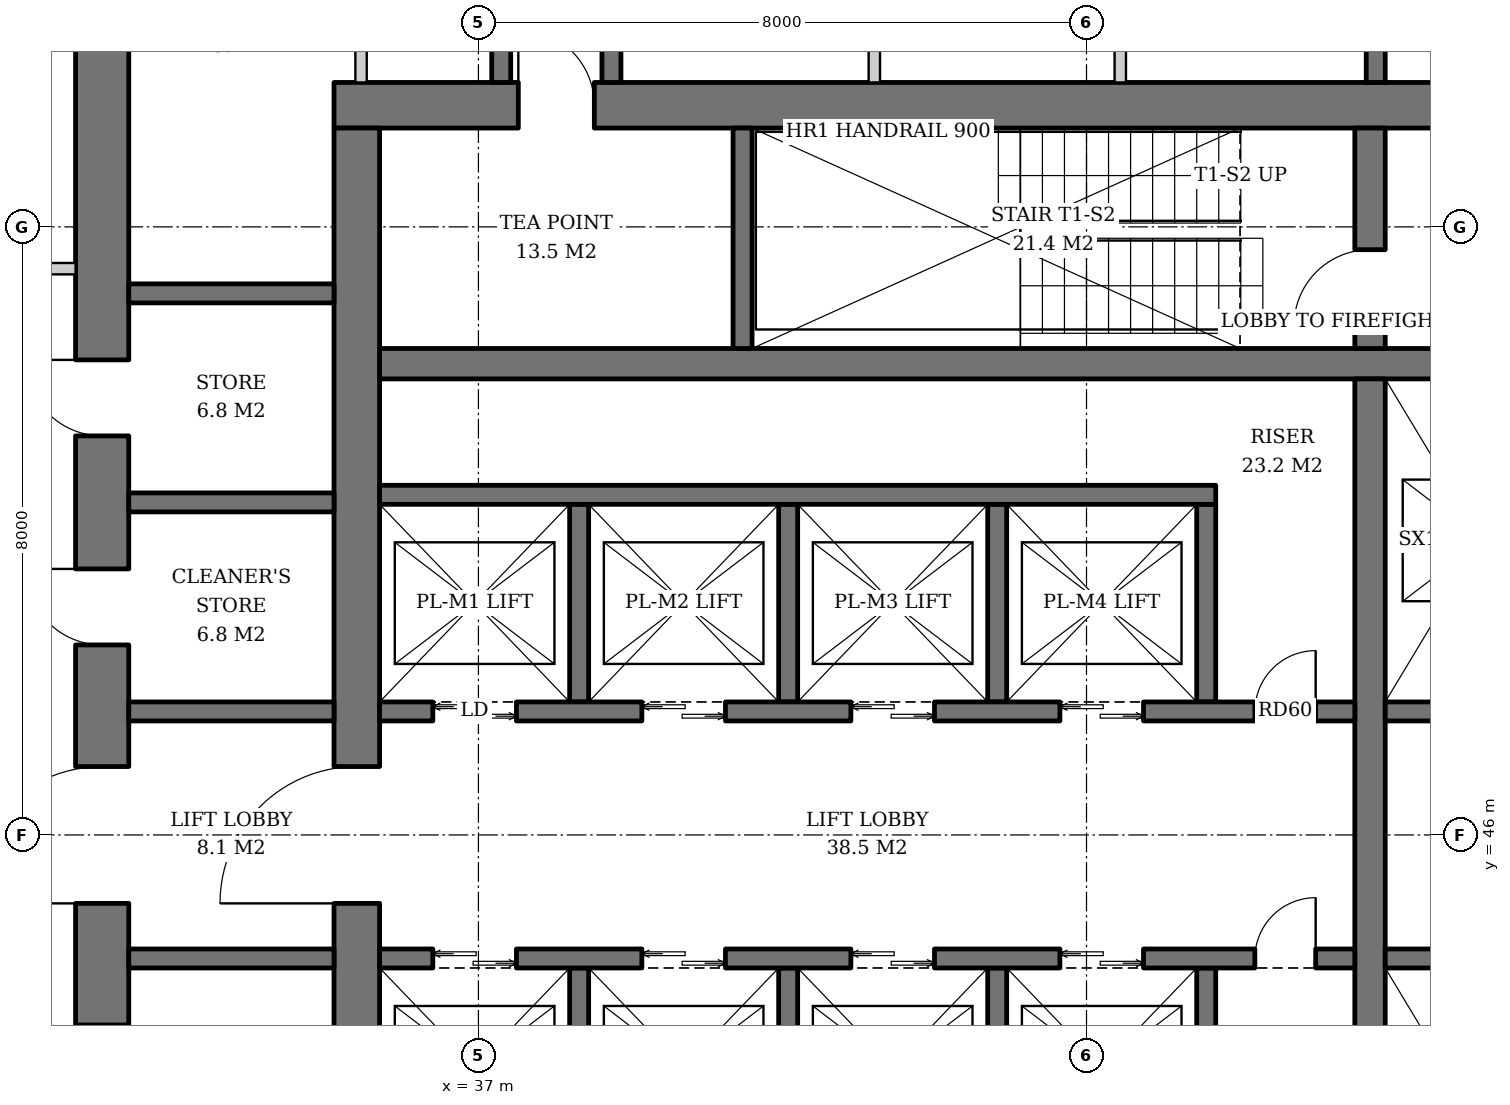
"""IFC4 building model, lengths in metres.
Left out: names, types, materials, properties, quantities, classifications, styles, units other than length and angle.
Written with IfcOpenShell. Run it as: python <this file> out.ifc"""

import sys

from ifc_helpers import new_model, si_unit, direction, frame, frame_2d, origin, place, context, subcontext, project, spatial, rectangle, extrude, element, fill, save


model = new_model("IFC4")
c1 = context("Model", 3, precision=1e-05, world=origin(), true_north=direction((0.0, 1.0)))
c2 = subcontext(c1, "Body", "Model", "MODEL_VIEW")
j1 = project(units=[si_unit("LENGTHUNIT", "METRE"), si_unit("PLANEANGLEUNIT", "RADIAN")], contexts=[c1])
p1 = place(None, origin())
s1 = spatial("IfcSite", under=j1, at=p1, CompositionType="ELEMENT")
p2 = place(p1, origin())
s2 = spatial("IfcBuilding", under=s1, at=p2, CompositionType="ELEMENT")
p3 = place(p2, frame((0.0, 0.0, 138.8)))
s3 = spatial("IfcBuildingStorey", under=s2, at=p3, CompositionType="ELEMENT", Elevation=138.8)
p4 = place(p3, frame((35.1, 55.6, 0.0), z_axis=(0.0, 0.0, 1.0), x_axis=(1.0, 0.0, 0.0)))
e1 = element("IfcWall", 1, at=p4, inside=s3, PredefinedType="SHEAR", context=c2, shape_type="SweptSolid", body=[
    extrude(rectangle(XDim=19.8, YDim=0.6, at=frame_2d((9.9, 0.0))), origin(), (0.0, 0.0, 1.0), 3.8),
])
p5 = place(p4, frame((14.54, 0.0, 0.0)))
e2 = element("IfcOpeningElement", 2, at=p5, cuts=e1, PredefinedType="OPENING", context=c2, shape_type="SweptSolid", body=[
    extrude(rectangle(XDim=1.0, YDim=2.1, at=frame_2d((0.5, 1.05))), frame((0.0, 0.31, 0.0), z_axis=(0.0, -1.0, 0.0), x_axis=(1.0, 0.0, 0.0)), (0.0, 0.0, 1.0), 0.62),
])
p6 = place(p4, frame((2.425, 0.0, 0.0)))
e3 = element("IfcOpeningElement", 3, at=p6, cuts=e1, PredefinedType="OPENING", context=c2, shape_type="SweptSolid", body=[
    extrude(rectangle(XDim=1.0, YDim=2.1, at=frame_2d((0.5, 1.05))), frame((0.0, 0.31, 0.0), z_axis=(0.0, -1.0, 0.0), x_axis=(1.0, 0.0, 0.0)), (0.0, 0.0, 1.0), 0.62),
])
p7 = place(p3, frame((35.4, 36.7, 0.0), z_axis=(0.0, 0.0, 1.0), x_axis=(0.0, 1.0, 0.0)))
e4 = element("IfcWall", 4, at=p7, inside=s3, PredefinedType="SHEAR", context=c2, shape_type="SweptSolid", body=[
    extrude(rectangle(XDim=18.6, YDim=0.6, at=frame_2d((9.3, 0.0))), origin(), (0.0, 0.0, 1.0), 3.8),
])
p8 = place(p7, frame((8.4, 0.0, 0.0)))
e5 = element("IfcOpeningElement", 5, at=p8, cuts=e4, PredefinedType="OPENING", context=c2, shape_type="SweptSolid", body=[
    extrude(rectangle(XDim=1.8, YDim=2.4, at=frame_2d((0.9, 1.2))), frame((0.0, 0.31, 0.0), z_axis=(0.0, -1.0, 0.0), x_axis=(1.0, 0.0, 0.0)), (0.0, 0.0, 1.0), 0.62),
])
p9 = place(p3, frame((32.05, 33.4, 0.0), z_axis=(0.0, 0.0, 1.0), x_axis=(0.0, 1.0, 0.0)))
e6 = element("IfcWall", 6, at=p9, inside=s3, PredefinedType="SHEAR", context=c2, shape_type="SweptSolid", body=[
    extrude(rectangle(XDim=25.2, YDim=0.7, at=frame_2d((12.6, 0.0))), origin(), (0.0, 0.0, 1.0), 3.8),
])
p10 = place(p9, frame((11.7, 0.0, 0.0)))
e7 = element("IfcOpeningElement", 7, at=p10, cuts=e6, PredefinedType="OPENING", context=c2, shape_type="SweptSolid", body=[
    extrude(rectangle(XDim=1.8, YDim=2.4, at=frame_2d((0.9, 1.2))), frame((0.0, 0.36, 0.0), z_axis=(0.0, -1.0, 0.0), x_axis=(1.0, 0.0, 0.0)), (0.0, 0.0, 1.0), 0.72),
])
p11 = place(p9, frame((3.6, 0.0, 0.0)))
e8 = element("IfcOpeningElement", 8, at=p11, cuts=e6, PredefinedType="OPENING", context=c2, shape_type="SweptSolid", body=[
    extrude(rectangle(XDim=1.0, YDim=2.1, at=frame_2d((0.5, 1.05))), frame((0.0, 0.36, 0.0), z_axis=(0.0, -1.0, 0.0), x_axis=(1.0, 0.0, 0.0)), (0.0, 0.0, 1.0), 0.72),
])
p12 = place(p9, frame((6.35, 0.0, 0.0)))
e9 = element("IfcOpeningElement", 9, at=p12, cuts=e6, PredefinedType="OPENING", context=c2, shape_type="SweptSolid", body=[
    extrude(rectangle(XDim=1.0, YDim=2.1, at=frame_2d((0.5, 1.05))), frame((0.0, 0.36, 0.0), z_axis=(0.0, -1.0, 0.0), x_axis=(1.0, 0.0, 0.0)), (0.0, 0.0, 1.0), 0.72),
])
p13 = place(p9, frame((9.1, 0.0, 0.0)))
e10 = element("IfcOpeningElement", 10, at=p13, cuts=e6, PredefinedType="OPENING", context=c2, shape_type="SweptSolid", body=[
    extrude(rectangle(XDim=1.0, YDim=2.1, at=frame_2d((0.5, 1.05))), frame((0.0, 0.36, 0.0), z_axis=(0.0, -1.0, 0.0), x_axis=(1.0, 0.0, 0.0)), (0.0, 0.0, 1.0), 0.72),
])
p14 = place(p9, frame((15.1, 0.0, 0.0)))
e11 = element("IfcOpeningElement", 11, at=p14, cuts=e6, PredefinedType="OPENING", context=c2, shape_type="SweptSolid", body=[
    extrude(rectangle(XDim=1.0, YDim=2.1, at=frame_2d((0.5, 1.05))), frame((0.0, 0.36, 0.0), z_axis=(0.0, -1.0, 0.0), x_axis=(1.0, 0.0, 0.0)), (0.0, 0.0, 1.0), 0.72),
])
p15 = place(p9, frame((17.85, 0.0, 0.0)))
e12 = element("IfcOpeningElement", 12, at=p15, cuts=e6, PredefinedType="OPENING", context=c2, shape_type="SweptSolid", body=[
    extrude(rectangle(XDim=1.0, YDim=2.1, at=frame_2d((0.5, 1.05))), frame((0.0, 0.36, 0.0), z_axis=(0.0, -1.0, 0.0), x_axis=(1.0, 0.0, 0.0)), (0.0, 0.0, 1.0), 0.72),
])
p16 = place(p3, frame((35.7, 52.2, 0.0), z_axis=(0.0, 0.0, 1.0), x_axis=(1.0, 0.0, 0.0)))
e13 = element("IfcWall", 13, at=p16, inside=s3, PredefinedType="SHEAR", context=c2, shape_type="SweptSolid", body=[
    extrude(rectangle(XDim=18.6, YDim=0.4, at=frame_2d((9.3, 0.0))), origin(), (0.0, 0.0, 1.0), 3.8),
])
p17 = place(p3, frame((48.73, 40.0, 0.0), z_axis=(0.0, 0.0, 1.0), x_axis=(0.0, 1.0, 0.0)))
e14 = element("IfcWall", 14, at=p17, inside=s3, PredefinedType="SHEAR", context=c2, shape_type="SweptSolid", body=[
    extrude(rectangle(XDim=12.0, YDim=0.4, at=frame_2d((6.0, 0.0))), origin(), (0.0, 0.0, 1.0), 3.8),
])
p18 = place(p3, frame((48.73, 52.4, 0.0), z_axis=(0.0, 0.0, 1.0), x_axis=(0.0, 1.0, 0.0)))
e15 = element("IfcWall", 15, at=p18, inside=s3, PredefinedType="SHEAR", context=c2, shape_type="SweptSolid", body=[
    extrude(rectangle(XDim=2.9, YDim=0.4, at=frame_2d((1.45, 0.0))), origin(), (0.0, 0.0, 1.0), 3.8),
])
p19 = place(p18, frame((0.3, 0.0, 0.0)))
e16 = element("IfcOpeningElement", 16, at=p19, cuts=e15, PredefinedType="OPENING", context=c2, shape_type="SweptSolid", body=[
    extrude(rectangle(XDim=1.0, YDim=2.1, at=frame_2d((0.5, 1.05))), frame((0.0, 0.21, 0.0), z_axis=(0.0, -1.0, 0.0), x_axis=(1.0, 0.0, 0.0)), (0.0, 0.0, 1.0), 0.42),
])
p20 = place(p3, frame((40.475, 52.4, 0.0), z_axis=(0.0, 0.0, 1.0), x_axis=(0.0, 1.0, 0.0)))
e17 = element("IfcWall", 17, at=p20, inside=s3, PredefinedType="SHEAR", context=c2, shape_type="SweptSolid", body=[
    extrude(rectangle(XDim=2.9, YDim=0.25, at=frame_2d((1.45, 0.0))), origin(), (0.0, 0.0, 1.0), 3.8),
])
for number, where, z_axis, x_axis in (
    (18, (38.325, 47.75, 0.0), (0.0, 0.0, 1.0), (0.0, 1.0, 0.0)),
    (19, (41.075, 47.75, 0.0), (0.0, 0.0, 1.0), (0.0, 1.0, 0.0)),
    (20, (43.825, 47.75, 0.0), (0.0, 0.0, 1.0), (0.0, 1.0, 0.0)),
    (21, (46.575, 47.75, 0.0), (0.0, 0.0, 1.0), (0.0, 1.0, 0.0)),
):
    element("IfcWall", number, at=place(p3, frame(where, z_axis=z_axis, x_axis=x_axis)), inside=s3, PredefinedType="SHEAR", context=c2, shape_type="SweptSolid", body=[
        extrude(rectangle(XDim=2.6, YDim=0.25, at=frame_2d((1.3, 0.0))), origin(), (0.0, 0.0, 1.0), 3.8),
    ])
p21 = place(p3, frame((35.7, 50.475, 0.0), z_axis=(0.0, 0.0, 1.0), x_axis=(1.0, 0.0, 0.0)))
e22 = element("IfcWall", 22, at=p21, inside=s3, PredefinedType="SHEAR", context=c2, shape_type="SweptSolid", body=[
    extrude(rectangle(XDim=11.0, YDim=0.25, at=frame_2d((5.5, 0.0))), origin(), (0.0, 0.0, 1.0), 3.8),
])
p22 = place(p3, frame((35.7, 47.625, 0.0), z_axis=(0.0, 0.0, 1.0), x_axis=(1.0, 0.0, 0.0)))
e23 = element("IfcWall", 23, at=p22, inside=s3, PredefinedType="SHEAR", context=c2, shape_type="SweptSolid", body=[
    extrude(rectangle(XDim=12.83, YDim=0.25, at=frame_2d((6.415, 0.0))), origin(), (0.0, 0.0, 1.0), 3.8),
])
p23 = place(p22, frame((0.7, 0.0, 0.0)))
e24 = element("IfcOpeningElement", 24, at=p23, cuts=e23, PredefinedType="OPENING", context=c2, shape_type="SweptSolid", body=[
    extrude(rectangle(XDim=1.1, YDim=2.2, at=frame_2d((0.55, 1.1))), frame((0.0, 0.135, 0.0), z_axis=(0.0, -1.0, 0.0), x_axis=(1.0, 0.0, 0.0)), (0.0, 0.0, 1.0), 0.27),
])
p24 = place(p22, frame((3.45, 0.0, 0.0)))
e25 = element("IfcOpeningElement", 25, at=p24, cuts=e23, PredefinedType="OPENING", context=c2, shape_type="SweptSolid", body=[
    extrude(rectangle(XDim=1.1, YDim=2.2, at=frame_2d((0.55, 1.1))), frame((0.0, 0.135, 0.0), z_axis=(0.0, -1.0, 0.0), x_axis=(1.0, 0.0, 0.0)), (0.0, 0.0, 1.0), 0.27),
])
p25 = place(p22, frame((6.2, 0.0, 0.0)))
e26 = element("IfcOpeningElement", 26, at=p25, cuts=e23, PredefinedType="OPENING", context=c2, shape_type="SweptSolid", body=[
    extrude(rectangle(XDim=1.1, YDim=2.2, at=frame_2d((0.55, 1.1))), frame((0.0, 0.135, 0.0), z_axis=(0.0, -1.0, 0.0), x_axis=(1.0, 0.0, 0.0)), (0.0, 0.0, 1.0), 0.27),
])
p26 = place(p22, frame((8.95, 0.0, 0.0)))
e27 = element("IfcOpeningElement", 27, at=p26, cuts=e23, PredefinedType="OPENING", context=c2, shape_type="SweptSolid", body=[
    extrude(rectangle(XDim=1.1, YDim=2.2, at=frame_2d((0.55, 1.1))), frame((0.0, 0.135, 0.0), z_axis=(0.0, -1.0, 0.0), x_axis=(1.0, 0.0, 0.0)), (0.0, 0.0, 1.0), 0.27),
])
p27 = place(p22, frame((11.515, 0.0, 0.0)))
e28 = element("IfcOpeningElement", 28, at=p27, cuts=e23, PredefinedType="OPENING", context=c2, shape_type="SweptSolid", body=[
    extrude(rectangle(XDim=0.8, YDim=2.0, at=frame_2d((0.4, 1.0))), frame((0.0, 0.135, 0.0), z_axis=(0.0, -1.0, 0.0), x_axis=(1.0, 0.0, 0.0)), (0.0, 0.0, 1.0), 0.27),
])
for number, where, z_axis, x_axis in (
    (29, (38.325, 44.25, 0.0), (0.0, 0.0, 1.0), (0.0, -1.0, 0.0)),
    (30, (41.075, 44.25, 0.0), (0.0, 0.0, 1.0), (0.0, -1.0, 0.0)),
    (31, (43.825, 44.25, 0.0), (0.0, 0.0, 1.0), (0.0, -1.0, 0.0)),
    (32, (46.575, 44.25, 0.0), (0.0, 0.0, 1.0), (0.0, -1.0, 0.0)),
):
    element("IfcWall", number, at=place(p3, frame(where, z_axis=z_axis, x_axis=x_axis)), inside=s3, PredefinedType="SHEAR", context=c2, shape_type="SweptSolid", body=[
        extrude(rectangle(XDim=2.6, YDim=0.25, at=frame_2d((1.3, 0.0))), origin(), (0.0, 0.0, 1.0), 3.8),
    ])
p28 = place(p3, frame((35.7, 44.375, 0.0), z_axis=(0.0, 0.0, 1.0), x_axis=(1.0, 0.0, 0.0)))
e33 = element("IfcWall", 33, at=p28, inside=s3, PredefinedType="SHEAR", context=c2, shape_type="SweptSolid", body=[
    extrude(rectangle(XDim=12.83, YDim=0.25, at=frame_2d((6.415, 0.0))), origin(), (0.0, 0.0, 1.0), 3.8),
])
p29 = place(p28, frame((0.7, 0.0, 0.0)))
e34 = element("IfcOpeningElement", 34, at=p29, cuts=e33, PredefinedType="OPENING", context=c2, shape_type="SweptSolid", body=[
    extrude(rectangle(XDim=1.1, YDim=2.2, at=frame_2d((0.55, 1.1))), frame((0.0, 0.135, 0.0), z_axis=(0.0, -1.0, 0.0), x_axis=(1.0, 0.0, 0.0)), (0.0, 0.0, 1.0), 0.27),
])
p30 = place(p28, frame((3.45, 0.0, 0.0)))
e35 = element("IfcOpeningElement", 35, at=p30, cuts=e33, PredefinedType="OPENING", context=c2, shape_type="SweptSolid", body=[
    extrude(rectangle(XDim=1.1, YDim=2.2, at=frame_2d((0.55, 1.1))), frame((0.0, 0.135, 0.0), z_axis=(0.0, -1.0, 0.0), x_axis=(1.0, 0.0, 0.0)), (0.0, 0.0, 1.0), 0.27),
])
p31 = place(p28, frame((6.2, 0.0, 0.0)))
e36 = element("IfcOpeningElement", 36, at=p31, cuts=e33, PredefinedType="OPENING", context=c2, shape_type="SweptSolid", body=[
    extrude(rectangle(XDim=1.1, YDim=2.2, at=frame_2d((0.55, 1.1))), frame((0.0, 0.135, 0.0), z_axis=(0.0, -1.0, 0.0), x_axis=(1.0, 0.0, 0.0)), (0.0, 0.0, 1.0), 0.27),
])
p32 = place(p28, frame((8.95, 0.0, 0.0)))
e37 = element("IfcOpeningElement", 37, at=p32, cuts=e33, PredefinedType="OPENING", context=c2, shape_type="SweptSolid", body=[
    extrude(rectangle(XDim=1.1, YDim=2.2, at=frame_2d((0.55, 1.1))), frame((0.0, 0.135, 0.0), z_axis=(0.0, -1.0, 0.0), x_axis=(1.0, 0.0, 0.0)), (0.0, 0.0, 1.0), 0.27),
])
p33 = place(p28, frame((11.515, 0.0, 0.0)))
e38 = element("IfcOpeningElement", 38, at=p33, cuts=e33, PredefinedType="OPENING", context=c2, shape_type="SweptSolid", body=[
    extrude(rectangle(XDim=0.8, YDim=2.0, at=frame_2d((0.4, 1.0))), frame((0.0, 0.135, 0.0), z_axis=(0.0, -1.0, 0.0), x_axis=(1.0, 0.0, 0.0)), (0.0, 0.0, 1.0), 0.27),
])
for number, where, z_axis, x_axis in (
    (39, (48.93, 47.625, 0.0), (0.0, 0.0, 1.0), (1.0, 0.0, 0.0)),
    (40, (48.93, 44.375, 0.0), (0.0, 0.0, 1.0), (1.0, 0.0, 0.0)),
):
    element("IfcWall", number, at=place(p3, frame(where, z_axis=z_axis, x_axis=x_axis)), inside=s3, PredefinedType="SHEAR", context=c2, shape_type="SweptSolid", body=[
        extrude(rectangle(XDim=5.37, YDim=0.25, at=frame_2d((2.685, 0.0))), origin(), (0.0, 0.0, 1.0), 3.8),
    ])
for number, where, z_axis, x_axis in (
    (41, (32.4, 44.375, 0.0), (0.0, 0.0, 1.0), (1.0, 0.0, 0.0)),
    (42, (32.4, 47.625, 0.0), (0.0, 0.0, 1.0), (1.0, 0.0, 0.0)),
    (43, (32.4, 50.375, 0.0), (0.0, 0.0, 1.0), (1.0, 0.0, 0.0)),
    (44, (32.4, 53.125, 0.0), (0.0, 0.0, 1.0), (1.0, 0.0, 0.0)),
):
    element("IfcWall", number, at=place(p3, frame(where, z_axis=z_axis, x_axis=x_axis)), inside=s3, PredefinedType="SHEAR", context=c2, shape_type="SweptSolid", body=[
        extrude(rectangle(XDim=2.7, YDim=0.25, at=frame_2d((1.35, 0.0))), origin(), (0.0, 0.0, 1.0), 3.8),
    ])
for number, where, z_axis, x_axis in (
    (45, (48.805, 55.9, 0.0), (0.0, 0.0, 1.0), (0.0, 1.0, 0.0)),
    (46, (37.3, 55.9, 0.0), (0.0, 0.0, 1.0), (0.0, 1.0, 0.0)),
    (47, (38.75, 55.9, 0.0), (0.0, 0.0, 1.0), (0.0, 1.0, 0.0)),
):
    element("IfcWall", number, at=place(p3, frame(where, z_axis=z_axis, x_axis=x_axis)), inside=s3, PredefinedType="SOLIDWALL", context=c2, shape_type="SweptSolid", body=[
        extrude(rectangle(XDim=2.7, YDim=0.25, at=frame_2d((1.35, 0.0))), origin(), (0.0, 0.0, 1.0), 3.62),
    ])
for number, where, z_axis, x_axis in (
    (48, (35.456, 55.9, 0.0), (0.0, 0.0, 1.0), (0.0, 1.0, 0.0)),
    (49, (42.209, 55.9, 0.0), (0.0, 0.0, 1.0), (0.0, 1.0, 0.0)),
    (50, (45.444, 55.9, 0.0), (0.0, 0.0, 1.0), (0.0, 1.0, 0.0)),
):
    element("IfcWall", number, at=place(p3, frame(where, z_axis=z_axis, x_axis=x_axis)), inside=s3, PredefinedType="SOLIDWALL", context=c2, shape_type="SweptSolid", body=[
        extrude(rectangle(XDim=2.7, YDim=0.15, at=frame_2d((1.35, 0.0))), origin(), (0.0, 0.0, 1.0), 3.62),
    ])
p34 = place(p3, frame((31.7, 53.45, 0.0), z_axis=(0.0, 0.0, 1.0), x_axis=(-1.0, 0.0, 0.0)))
e51 = element("IfcWall", 51, at=p34, inside=s3, PredefinedType="PARTITIONING", context=c2, shape_type="SweptSolid", body=[
    extrude(rectangle(XDim=1.725, YDim=0.15, at=frame_2d((0.862, 0.0))), origin(), (0.0, 0.0, 1.0), 3.62),
])
p35 = place(p23, origin())
e52 = element("IfcDoor", 52, at=p35, inside=s3, OperationType="DOUBLE_DOOR_SLIDING", PredefinedType="DOOR", context=c2, shape_type="SweptSolid", body=[
    extrude(rectangle(XDim=1.1, YDim=2.2, at=frame_2d((0.55, 1.1))), frame((0.0, 0.025, 0.0), z_axis=(0.0, -1.0, 0.0), x_axis=(1.0, 0.0, 0.0)), (0.0, 0.0, 1.0), 0.05),
])
fill(e24, e52)
p36 = place(p24, origin())
e53 = element("IfcDoor", 53, at=p36, inside=s3, OperationType="DOUBLE_DOOR_SLIDING", PredefinedType="DOOR", context=c2, shape_type="SweptSolid", body=[
    extrude(rectangle(XDim=1.1, YDim=2.2, at=frame_2d((0.55, 1.1))), frame((0.0, 0.025, 0.0), z_axis=(0.0, -1.0, 0.0), x_axis=(1.0, 0.0, 0.0)), (0.0, 0.0, 1.0), 0.05),
])
fill(e25, e53)
p37 = place(p25, origin())
e54 = element("IfcDoor", 54, at=p37, inside=s3, OperationType="DOUBLE_DOOR_SLIDING", PredefinedType="DOOR", context=c2, shape_type="SweptSolid", body=[
    extrude(rectangle(XDim=1.1, YDim=2.2, at=frame_2d((0.55, 1.1))), frame((0.0, 0.025, 0.0), z_axis=(0.0, -1.0, 0.0), x_axis=(1.0, 0.0, 0.0)), (0.0, 0.0, 1.0), 0.05),
])
fill(e26, e54)
p38 = place(p26, origin())
e55 = element("IfcDoor", 55, at=p38, inside=s3, OperationType="DOUBLE_DOOR_SLIDING", PredefinedType="DOOR", context=c2, shape_type="SweptSolid", body=[
    extrude(rectangle(XDim=1.1, YDim=2.2, at=frame_2d((0.55, 1.1))), frame((0.0, 0.025, 0.0), z_axis=(0.0, -1.0, 0.0), x_axis=(1.0, 0.0, 0.0)), (0.0, 0.0, 1.0), 0.05),
])
fill(e27, e55)
p39 = place(p27, origin())
e56 = element("IfcDoor", 56, at=p39, inside=s3, OperationType="SINGLE_SWING_RIGHT", PredefinedType="DOOR", context=c2, shape_type="SweptSolid", body=[
    extrude(rectangle(XDim=0.8, YDim=2.0, at=frame_2d((0.4, 1.0))), frame((0.0, 0.025, 0.0), z_axis=(0.0, -1.0, 0.0), x_axis=(1.0, 0.0, 0.0)), (0.0, 0.0, 1.0), 0.05),
])
fill(e28, e56)
p40 = place(p29, origin())
e57 = element("IfcDoor", 57, at=p40, inside=s3, OperationType="DOUBLE_DOOR_SLIDING", PredefinedType="DOOR", context=c2, shape_type="SweptSolid", body=[
    extrude(rectangle(XDim=1.1, YDim=2.2, at=frame_2d((0.55, 1.1))), frame((0.0, 0.025, 0.0), z_axis=(0.0, -1.0, 0.0), x_axis=(1.0, 0.0, 0.0)), (0.0, 0.0, 1.0), 0.05),
])
fill(e34, e57)
p41 = place(p30, origin())
e58 = element("IfcDoor", 58, at=p41, inside=s3, OperationType="DOUBLE_DOOR_SLIDING", PredefinedType="DOOR", context=c2, shape_type="SweptSolid", body=[
    extrude(rectangle(XDim=1.1, YDim=2.2, at=frame_2d((0.55, 1.1))), frame((0.0, 0.025, 0.0), z_axis=(0.0, -1.0, 0.0), x_axis=(1.0, 0.0, 0.0)), (0.0, 0.0, 1.0), 0.05),
])
fill(e35, e58)
p42 = place(p31, origin())
e59 = element("IfcDoor", 59, at=p42, inside=s3, OperationType="DOUBLE_DOOR_SLIDING", PredefinedType="DOOR", context=c2, shape_type="SweptSolid", body=[
    extrude(rectangle(XDim=1.1, YDim=2.2, at=frame_2d((0.55, 1.1))), frame((0.0, 0.025, 0.0), z_axis=(0.0, -1.0, 0.0), x_axis=(1.0, 0.0, 0.0)), (0.0, 0.0, 1.0), 0.05),
])
fill(e36, e59)
p43 = place(p32, origin())
e60 = element("IfcDoor", 60, at=p43, inside=s3, OperationType="DOUBLE_DOOR_SLIDING", PredefinedType="DOOR", context=c2, shape_type="SweptSolid", body=[
    extrude(rectangle(XDim=1.1, YDim=2.2, at=frame_2d((0.55, 1.1))), frame((0.0, 0.025, 0.0), z_axis=(0.0, -1.0, 0.0), x_axis=(1.0, 0.0, 0.0)), (0.0, 0.0, 1.0), 0.05),
])
fill(e37, e60)
p44 = place(p33, origin())
e61 = element("IfcDoor", 61, at=p44, inside=s3, OperationType="SINGLE_SWING_RIGHT", PredefinedType="DOOR", context=c2, shape_type="SweptSolid", body=[
    extrude(rectangle(XDim=0.8, YDim=2.0, at=frame_2d((0.4, 1.0))), frame((0.0, 0.025, 0.0), z_axis=(0.0, -1.0, 0.0), x_axis=(1.0, 0.0, 0.0)), (0.0, 0.0, 1.0), 0.05),
])
fill(e38, e61)
p45 = place(p19, origin())
e62 = element("IfcDoor", 62, at=p45, inside=s3, OperationType="SINGLE_SWING_LEFT", PredefinedType="DOOR", context=c2, shape_type="SweptSolid", body=[
    extrude(rectangle(XDim=1.0, YDim=2.1, at=frame_2d((0.5, 1.05))), frame((0.0, 0.025, 0.0), z_axis=(0.0, -1.0, 0.0), x_axis=(1.0, 0.0, 0.0)), (0.0, 0.0, 1.0), 0.05),
])
fill(e16, e62)
p46 = place(p8, origin())
e63 = element("IfcDoor", 63, at=p46, inside=s3, OperationType="DOUBLE_DOOR_SINGLE_SWING", PredefinedType="DOOR", context=c2, shape_type="SweptSolid", body=[
    extrude(rectangle(XDim=1.8, YDim=2.4, at=frame_2d((0.9, 1.2))), frame((0.0, 0.025, 0.0), z_axis=(0.0, -1.0, 0.0), x_axis=(1.0, 0.0, 0.0)), (0.0, 0.0, 1.0), 0.05),
])
fill(e5, e63)
p47 = place(p10, origin())
e64 = element("IfcDoor", 64, at=p47, inside=s3, OperationType="DOUBLE_DOOR_SINGLE_SWING", PredefinedType="DOOR", context=c2, shape_type="SweptSolid", body=[
    extrude(rectangle(XDim=1.8, YDim=2.4, at=frame_2d((0.9, 1.2))), frame((0.0, 0.025, 0.0), z_axis=(0.0, -1.0, 0.0), x_axis=(1.0, 0.0, 0.0)), (0.0, 0.0, 1.0), 0.05),
])
fill(e7, e64)
p48 = place(p6, origin())
e65 = element("IfcDoor", 65, at=p48, inside=s3, OperationType="SINGLE_SWING_LEFT", PredefinedType="DOOR", context=c2, shape_type="SweptSolid", body=[
    extrude(rectangle(XDim=1.0, YDim=2.1, at=frame_2d((0.5, 1.05))), frame((0.0, -0.24, 0.0), z_axis=(0.0, -1.0, 0.0), x_axis=(1.0, 0.0, 0.0)), (0.0, 0.0, 1.0), 0.05),
])
fill(e3, e65)
p49 = place(p14, origin())
e66 = element("IfcDoor", 66, at=p49, inside=s3, OperationType="SINGLE_SWING_RIGHT", PredefinedType="DOOR", context=c2, shape_type="SweptSolid", body=[
    extrude(rectangle(XDim=1.0, YDim=2.1, at=frame_2d((0.5, 1.05))), frame((0.0, -0.29, 0.0), z_axis=(0.0, -1.0, 0.0), x_axis=(1.0, 0.0, 0.0)), (0.0, 0.0, 1.0), 0.05),
])
fill(e11, e66)
p50 = place(p15, origin())
e67 = element("IfcDoor", 67, at=p50, inside=s3, OperationType="SINGLE_SWING_RIGHT", PredefinedType="DOOR", context=c2, shape_type="SweptSolid", body=[
    extrude(rectangle(XDim=1.0, YDim=2.1, at=frame_2d((0.5, 1.05))), frame((0.0, -0.29, 0.0), z_axis=(0.0, -1.0, 0.0), x_axis=(1.0, 0.0, 0.0)), (0.0, 0.0, 1.0), 0.05),
])
fill(e12, e67)
save(model, sys.argv[1])
